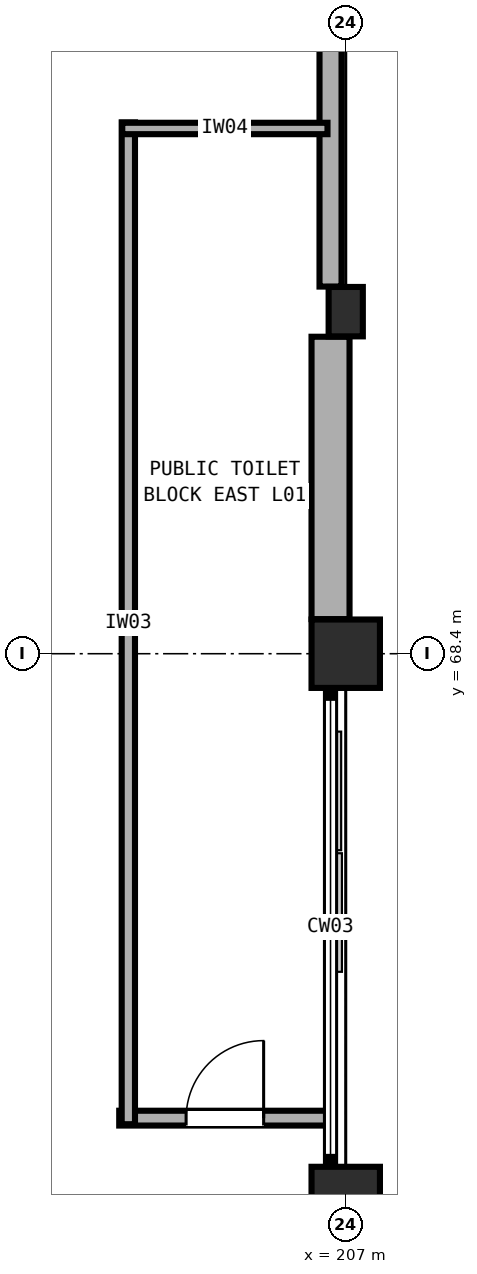
"""IFC4 building model, lengths in metres.
Left out: names, types, materials, properties, quantities, classifications, styles, units other than length and angle.
Written with IfcOpenShell. Run it as: python <this file> out.ifc"""

import sys

from ifc_helpers import new_model, si_unit, direction, frame, frame_2d, origin, origin_2d, place, context, subcontext, project, spatial, rectangle, extrude, element, fill, save


model = new_model("IFC4")
c1 = context("Model", 3, precision=1e-05, world=origin(), true_north=direction((0.0, 1.0)))
c2 = subcontext(c1, "Body", "Model", "MODEL_VIEW")
j1 = project(units=[si_unit("LENGTHUNIT", "METRE"), si_unit("PLANEANGLEUNIT", "RADIAN")], contexts=[c1])
p1 = place(None, origin())
s1 = spatial("IfcSite", under=j1, at=p1, CompositionType="ELEMENT")
p2 = place(p1, origin())
s2 = spatial("IfcBuilding", under=s1, at=p2, CompositionType="ELEMENT")
p3 = place(p2, frame((0.0, 0.0, 4.8)))
s3 = spatial("IfcBuildingStorey", under=s2, at=p3, CompositionType="ELEMENT", Elevation=4.8)
for number, where, z_axis, x_axis in (
    (1, (207.0, 61.2, 0.0), (0.0, 0.0, 1.0), (1.0, 0.0, 0.0)),
    (2, (207.0, 68.4, 0.0), (0.0, 0.0, 1.0), (1.0, 0.0, 0.0)),
):
    element("IfcColumn", number, at=place(p3, frame(where, z_axis=z_axis, x_axis=x_axis)), inside=s3, PredefinedType="COLUMN", context=c2, shape_type="SweptSolid", body=[
        extrude(rectangle(XDim=0.9, YDim=0.9, at=origin_2d()), origin(), (0.0, 0.0, 1.0), 4.8),
    ])
p4 = place(p3, frame((207.0, 72.9, 0.0), z_axis=(0.0, 0.0, 1.0), x_axis=(1.0, 0.0, 0.0)))
e3 = element("IfcColumn", 3, at=p4, inside=s3, PredefinedType="PILASTER", context=c2, shape_type="SweptSolid", body=[
    extrude(rectangle(XDim=0.45, YDim=0.65, at=origin_2d()), origin(), (0.0, 0.0, 1.0), 4.8),
])
p5 = place(p3, frame((206.8, 76.945, 0.0), z_axis=(0.0, 0.0, 1.0), x_axis=(0.0, -1.0, 0.0)))
e4 = element("IfcWall", 4, at=p5, inside=s3, PredefinedType="SOLIDWALL", context=c2, shape_type="SweptSolid", body=[
    extrude(rectangle(XDim=3.715, YDim=0.29, at=frame_2d((1.857, 0.0))), origin(), (0.0, 0.0, 1.0), 3.58),
])
p6 = place(p3, frame((206.8, 72.57, 0.0), z_axis=(0.0, 0.0, 1.0), x_axis=(0.0, -1.0, 0.0)))
e5 = element("IfcWall", 5, at=p6, inside=s3, PredefinedType="SOLIDWALL", context=c2, shape_type="SweptSolid", body=[
    extrude(rectangle(XDim=3.715, YDim=0.5, at=frame_2d((1.857, 0.0))), origin(), (0.0, 0.0, 1.0), 3.58),
])
p7 = place(p3, frame((204.02, 62.29, 0.0), z_axis=(0.0, 0.0, 1.0), x_axis=(1.0, 0.0, 0.0)))
e6 = element("IfcWall", 6, at=p7, inside=s3, PredefinedType="PARTITIONING", context=c2, shape_type="SweptSolid", body=[
    extrude(rectangle(XDim=2.78, YDim=0.195, at=frame_2d((1.39, 0.0))), origin(), (0.0, 0.0, 1.0), 3.28),
])
p8 = place(p7, frame((0.88, 0.0, 0.0)))
e7 = element("IfcOpeningElement", 7, at=p8, cuts=e6, PredefinedType="OPENING", context=c2, shape_type="SweptSolid", body=[
    extrude(rectangle(XDim=1.02, YDim=2.16, at=frame_2d((0.51, 1.08))), frame((0.0, 0.107, 0.0), z_axis=(0.0, -1.0, 0.0), x_axis=(1.0, 0.0, 0.0)), (0.0, 0.0, 1.0), 0.215),
])
p9 = place(p3, frame((204.14, 62.21, 0.0), z_axis=(0.0, 0.0, 1.0), x_axis=(0.0, 1.0, 0.0)))
e8 = element("IfcWall", 8, at=p9, inside=s3, PredefinedType="PARTITIONING", context=c2, shape_type="SweptSolid", body=[
    extrude(rectangle(XDim=13.18, YDim=0.175, at=frame_2d((6.59, 0.0))), origin(), (0.0, 0.0, 1.0), 3.28),
])
p10 = place(p3, frame((204.06, 75.31, 0.0), z_axis=(0.0, 0.0, 1.0), x_axis=(1.0, 0.0, 0.0)))
e9 = element("IfcWall", 9, at=p10, inside=s3, PredefinedType="PARTITIONING", context=c2, shape_type="SweptSolid", body=[
    extrude(rectangle(XDim=2.7, YDim=0.15, at=frame_2d((1.35, 0.0))), origin(), (0.0, 0.0, 1.0), 3.28),
])
p11 = place(p8, origin())
e10 = element("IfcDoor", 10, at=p11, inside=s3, OperationType="SINGLE_SWING_RIGHT", PredefinedType="DOOR", context=c2, shape_type="SweptSolid", body=[
    extrude(rectangle(XDim=1.02, YDim=2.16, at=frame_2d((0.51, 1.08))), frame((0.0, 0.025, 0.0), z_axis=(0.0, -1.0, 0.0), x_axis=(1.0, 0.0, 0.0)), (0.0, 0.0, 1.0), 0.05),
])
fill(e7, e10)
save(model, sys.argv[1])
